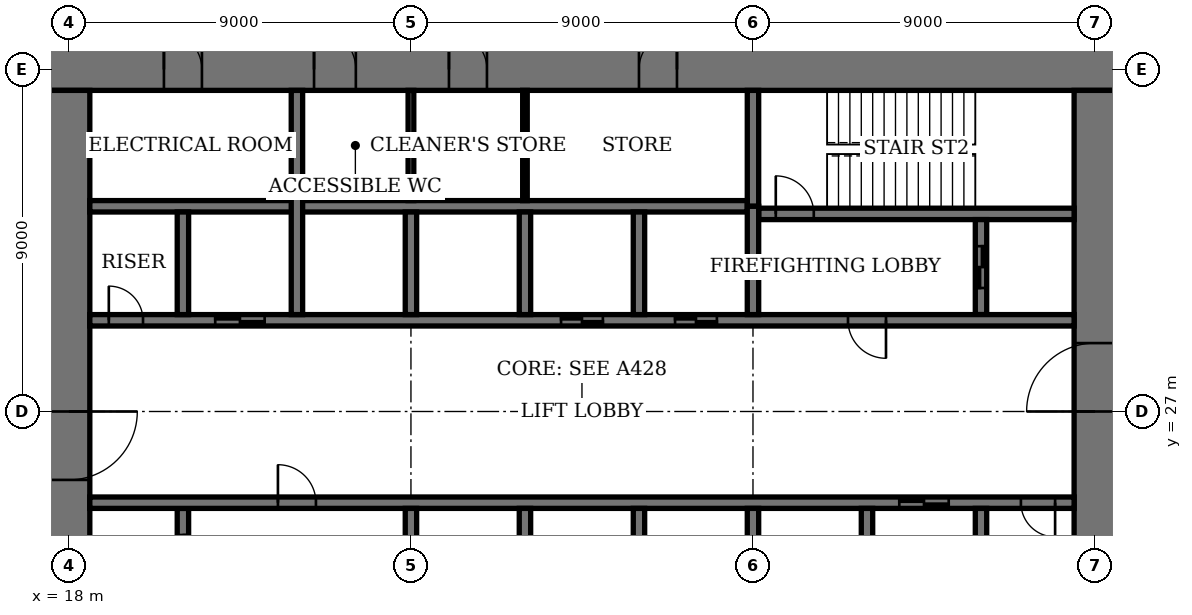
"""IFC4 building model, lengths in metres.
Left out: names, types, materials, properties, quantities, classifications, styles, units other than length and angle.
Written with IfcOpenShell. Run it as: python <this file> out.ifc"""

import sys

from ifc_helpers import new_model, si_unit, direction, frame, frame_2d, origin, place, context, subcontext, project, spatial, rectangle, extrude, element, fill, save


model = new_model("IFC4")
c1 = context("Model", 3, precision=1e-05, world=origin(), true_north=direction((0.0, 1.0)))
c2 = subcontext(c1, "Body", "Model", "MODEL_VIEW")
j1 = project(units=[si_unit("LENGTHUNIT", "METRE"), si_unit("PLANEANGLEUNIT", "RADIAN")], contexts=[c1])
p1 = place(None, origin())
s1 = spatial("IfcSite", under=j1, at=p1, CompositionType="ELEMENT")
p2 = place(p1, origin())
s2 = spatial("IfcBuilding", under=s1, at=p2, CompositionType="ELEMENT")
p3 = place(p2, frame((0.0, 0.0, 121.0)))
s3 = spatial("IfcBuildingStorey", under=s2, at=p3, CompositionType="ELEMENT", Elevation=121.0)
p4 = place(p3, frame((45.55, 36.0, 0.0), z_axis=(0.0, 0.0, 1.0), x_axis=(-1.0, 0.0, 0.0)))
e1 = element("IfcWall", 1, at=p4, inside=s3, PredefinedType="SHEAR", context=c2, shape_type="SweptSolid", body=[
    extrude(rectangle(XDim=28.1, YDim=1.1, at=frame_2d((14.05, 0.0))), origin(), (0.0, 0.0, 1.0), 4.0),
])
p5 = place(p4, frame((11.55, 0.0, 0.0)))
e2 = element("IfcOpeningElement", 2, at=p5, cuts=e1, PredefinedType="OPENING", context=c2, shape_type="SweptSolid", body=[
    extrude(rectangle(XDim=1.0, YDim=2.4, at=frame_2d((0.5, 1.2))), frame((0.0, 0.56, 0.0), z_axis=(0.0, -1.0, 0.0), x_axis=(1.0, 0.0, 0.0)), (0.0, 0.0, 1.0), 1.12),
])
p6 = place(p4, frame((16.55, 0.0, 0.0)))
e3 = element("IfcOpeningElement", 3, at=p6, cuts=e1, PredefinedType="OPENING", context=c2, shape_type="SweptSolid", body=[
    extrude(rectangle(XDim=1.0, YDim=2.4, at=frame_2d((0.5, 1.2))), frame((0.0, 0.56, 0.0), z_axis=(0.0, -1.0, 0.0), x_axis=(1.0, 0.0, 0.0)), (0.0, 0.0, 1.0), 1.12),
])
p7 = place(p4, frame((20.0, 0.0, 0.0)))
e4 = element("IfcOpeningElement", 4, at=p7, cuts=e1, PredefinedType="OPENING", context=c2, shape_type="SweptSolid", body=[
    extrude(rectangle(XDim=1.1, YDim=2.4, at=frame_2d((0.55, 1.2))), frame((0.0, 0.56, 0.0), z_axis=(0.0, -1.0, 0.0), x_axis=(1.0, 0.0, 0.0)), (0.0, 0.0, 1.0), 1.12),
])
p8 = place(p4, frame((24.05, 0.0, 0.0)))
e5 = element("IfcOpeningElement", 5, at=p8, cuts=e1, PredefinedType="OPENING", context=c2, shape_type="SweptSolid", body=[
    extrude(rectangle(XDim=1.0, YDim=2.4, at=frame_2d((0.5, 1.2))), frame((0.0, 0.56, 0.0), z_axis=(0.0, -1.0, 0.0), x_axis=(1.0, 0.0, 0.0)), (0.0, 0.0, 1.0), 1.12),
])
p9 = place(p3, frame((18.0, 35.45, 0.0), z_axis=(0.0, 0.0, 1.0), x_axis=(0.0, -1.0, 0.0)))
e6 = element("IfcWall", 6, at=p9, inside=s3, PredefinedType="SHEAR", context=c2, shape_type="SweptSolid", body=[
    extrude(rectangle(XDim=16.9, YDim=1.1, at=frame_2d((8.45, 0.0))), origin(), (0.0, 0.0, 1.0), 4.0),
])
p10 = place(p9, frame((8.45, 0.0, 0.0)))
e7 = element("IfcOpeningElement", 7, at=p10, cuts=e6, PredefinedType="OPENING", context=c2, shape_type="SweptSolid", body=[
    extrude(rectangle(XDim=1.8, YDim=2.4, at=frame_2d((0.9, 1.2))), frame((0.0, 0.56, 0.0), z_axis=(0.0, -1.0, 0.0), x_axis=(1.0, 0.0, 0.0)), (0.0, 0.0, 1.0), 1.12),
])
p11 = place(p3, frame((45.0, 18.55, 0.0), z_axis=(0.0, 0.0, 1.0), x_axis=(0.0, 1.0, 0.0)))
e8 = element("IfcWall", 8, at=p11, inside=s3, PredefinedType="SHEAR", context=c2, shape_type="SweptSolid", body=[
    extrude(rectangle(XDim=16.9, YDim=1.1, at=frame_2d((8.45, 0.0))), origin(), (0.0, 0.0, 1.0), 4.0),
])
p12 = place(p11, frame((8.45, 0.0, 0.0)))
e9 = element("IfcOpeningElement", 9, at=p12, cuts=e8, PredefinedType="OPENING", context=c2, shape_type="SweptSolid", body=[
    extrude(rectangle(XDim=1.8, YDim=2.4, at=frame_2d((0.9, 1.2))), frame((0.0, 0.56, 0.0), z_axis=(0.0, -1.0, 0.0), x_axis=(1.0, 0.0, 0.0)), (0.0, 0.0, 1.0), 1.12),
])
p13 = place(p3, frame((36.15, 32.2, 0.0), z_axis=(0.0, 0.0, 1.0), x_axis=(1.0, 0.0, 0.0)))
e10 = element("IfcWall", 10, at=p13, inside=s3, PredefinedType="SHEAR", context=c2, shape_type="SweptSolid", body=[
    extrude(rectangle(XDim=8.3, YDim=0.3, at=frame_2d((4.15, 0.0))), origin(), (0.0, 0.0, 1.0), 4.0),
])
p14 = place(p13, frame((0.45, 0.0, 0.0)))
e11 = element("IfcOpeningElement", 11, at=p14, cuts=e10, PredefinedType="OPENING", context=c2, shape_type="SweptSolid", body=[
    extrude(rectangle(XDim=1.0, YDim=2.4, at=frame_2d((0.5, 1.2))), frame((0.0, 0.16, 0.0), z_axis=(0.0, -1.0, 0.0), x_axis=(1.0, 0.0, 0.0)), (0.0, 0.0, 1.0), 0.32),
])
p15 = place(p3, frame((36.0, 32.4, 0.0), z_axis=(0.0, 0.0, 1.0), x_axis=(0.0, 1.0, 0.0)))
e12 = element("IfcWall", 12, at=p15, inside=s3, PredefinedType="SHEAR", context=c2, shape_type="SweptSolid", body=[
    extrude(rectangle(XDim=3.05, YDim=0.3, at=frame_2d((1.525, 0.0))), origin(), (0.0, 0.0, 1.0), 4.0),
])
p16 = place(p3, frame((21.0, 21.95, 0.0), z_axis=(0.0, 0.0, 1.0), x_axis=(0.0, 1.0, 0.0)))
e13 = element("IfcWall", 13, at=p16, inside=s3, PredefinedType="SHEAR", context=c2, shape_type="SweptSolid", body=[
    extrude(rectangle(XDim=2.5, YDim=0.3, at=frame_2d((1.25, 0.0))), origin(), (0.0, 0.0, 1.0), 4.0),
])
p17 = place(p16, frame((0.7, 0.0, 0.0)))
e14 = element("IfcOpeningElement", 14, at=p17, cuts=e13, PredefinedType="OPENING", context=c2, shape_type="SweptSolid", body=[
    extrude(rectangle(XDim=1.1, YDim=2.4, at=frame_2d((0.55, 1.2))), frame((0.0, 0.16, 0.0), z_axis=(0.0, -1.0, 0.0), x_axis=(1.0, 0.0, 0.0)), (0.0, 0.0, 1.0), 0.32),
])
p18 = place(p3, frame((42.0, 29.55, 0.0), z_axis=(0.0, 0.0, 1.0), x_axis=(0.0, 1.0, 0.0)))
e15 = element("IfcWall", 15, at=p18, inside=s3, PredefinedType="SHEAR", context=c2, shape_type="SweptSolid", body=[
    extrude(rectangle(XDim=2.5, YDim=0.3, at=frame_2d((1.25, 0.0))), origin(), (0.0, 0.0, 1.0), 4.0),
])
p19 = place(p18, frame((0.7, 0.0, 0.0)))
e16 = element("IfcOpeningElement", 16, at=p19, cuts=e15, PredefinedType="OPENING", context=c2, shape_type="SweptSolid", body=[
    extrude(rectangle(XDim=1.1, YDim=2.4, at=frame_2d((0.55, 1.2))), frame((0.0, 0.16, 0.0), z_axis=(0.0, -1.0, 0.0), x_axis=(1.0, 0.0, 0.0)), (0.0, 0.0, 1.0), 0.32),
])
p20 = place(p3, frame((18.55, 24.6, 0.0), z_axis=(0.0, 0.0, 1.0), x_axis=(1.0, 0.0, 0.0)))
e17 = element("IfcWall", 17, at=p20, inside=s3, PredefinedType="SHEAR", context=c2, shape_type="SweptSolid", body=[
    extrude(rectangle(XDim=25.9, YDim=0.3, at=frame_2d((12.95, 0.0))), origin(), (0.0, 0.0, 1.0), 4.0),
])
p21 = place(p20, frame((4.95, 0.0, 0.0)))
e18 = element("IfcOpeningElement", 18, at=p21, cuts=e17, PredefinedType="OPENING", context=c2, shape_type="SweptSolid", body=[
    extrude(rectangle(XDim=1.0, YDim=2.4, at=frame_2d((0.5, 1.2))), frame((0.0, 0.16, 0.0), z_axis=(0.0, -1.0, 0.0), x_axis=(1.0, 0.0, 0.0)), (0.0, 0.0, 1.0), 0.32),
])
p22 = place(p20, frame((24.5, 0.0, 0.0)))
e19 = element("IfcOpeningElement", 19, at=p22, cuts=e17, PredefinedType="OPENING", context=c2, shape_type="SweptSolid", body=[
    extrude(rectangle(XDim=0.9, YDim=2.1, at=frame_2d((0.45, 1.05))), frame((0.0, 0.16, 0.0), z_axis=(0.0, -1.0, 0.0), x_axis=(1.0, 0.0, 0.0)), (0.0, 0.0, 1.0), 0.32),
])
p23 = place(p20, frame((21.3, 0.0, 0.0)))
e20 = element("IfcOpeningElement", 20, at=p23, cuts=e17, PredefinedType="OPENING", context=c2, shape_type="SweptSolid", body=[
    extrude(rectangle(XDim=1.3, YDim=2.4, at=frame_2d((0.65, 1.2))), frame((0.0, 0.16, 0.0), z_axis=(0.0, -1.0, 0.0), x_axis=(1.0, 0.0, 0.0)), (0.0, 0.0, 1.0), 0.32),
])
p24 = place(p3, frame((18.55, 29.4, 0.0), z_axis=(0.0, 0.0, 1.0), x_axis=(1.0, 0.0, 0.0)))
e21 = element("IfcWall", 21, at=p24, inside=s3, PredefinedType="SHEAR", context=c2, shape_type="SweptSolid", body=[
    extrude(rectangle(XDim=25.9, YDim=0.3, at=frame_2d((12.95, 0.0))), origin(), (0.0, 0.0, 1.0), 4.0),
])
p25 = place(p24, frame((19.95, 0.0, 0.0)))
e22 = element("IfcOpeningElement", 22, at=p25, cuts=e21, PredefinedType="OPENING", context=c2, shape_type="SweptSolid", body=[
    extrude(rectangle(XDim=1.0, YDim=2.4, at=frame_2d((0.5, 1.2))), frame((0.0, 0.16, 0.0), z_axis=(0.0, -1.0, 0.0), x_axis=(1.0, 0.0, 0.0)), (0.0, 0.0, 1.0), 0.32),
])
p26 = place(p24, frame((0.5, 0.0, 0.0)))
e23 = element("IfcOpeningElement", 23, at=p26, cuts=e21, PredefinedType="OPENING", context=c2, shape_type="SweptSolid", body=[
    extrude(rectangle(XDim=0.9, YDim=2.1, at=frame_2d((0.45, 1.05))), frame((0.0, 0.16, 0.0), z_axis=(0.0, -1.0, 0.0), x_axis=(1.0, 0.0, 0.0)), (0.0, 0.0, 1.0), 0.32),
])
p27 = place(p24, frame((15.4, 0.0, 0.0)))
e24 = element("IfcOpeningElement", 24, at=p27, cuts=e21, PredefinedType="OPENING", context=c2, shape_type="SweptSolid", body=[
    extrude(rectangle(XDim=1.1, YDim=2.4, at=frame_2d((0.55, 1.2))), frame((0.0, 0.16, 0.0), z_axis=(0.0, -1.0, 0.0), x_axis=(1.0, 0.0, 0.0)), (0.0, 0.0, 1.0), 0.32),
])
p28 = place(p24, frame((12.4, 0.0, 0.0)))
e25 = element("IfcOpeningElement", 25, at=p28, cuts=e21, PredefinedType="OPENING", context=c2, shape_type="SweptSolid", body=[
    extrude(rectangle(XDim=1.1, YDim=2.4, at=frame_2d((0.55, 1.2))), frame((0.0, 0.16, 0.0), z_axis=(0.0, -1.0, 0.0), x_axis=(1.0, 0.0, 0.0)), (0.0, 0.0, 1.0), 0.32),
])
p29 = place(p24, frame((3.3, 0.0, 0.0)))
e26 = element("IfcOpeningElement", 26, at=p29, cuts=e21, PredefinedType="OPENING", context=c2, shape_type="SweptSolid", body=[
    extrude(rectangle(XDim=1.3, YDim=2.4, at=frame_2d((0.65, 1.2))), frame((0.0, 0.16, 0.0), z_axis=(0.0, -1.0, 0.0), x_axis=(1.0, 0.0, 0.0)), (0.0, 0.0, 1.0), 0.32),
])
p30 = place(p3, frame((18.55, 32.4, 0.0), z_axis=(0.0, 0.0, 1.0), x_axis=(1.0, 0.0, 0.0)))
e27 = element("IfcWall", 27, at=p30, inside=s3, PredefinedType="SHEAR", context=c2, shape_type="SweptSolid", body=[
    extrude(rectangle(XDim=17.3, YDim=0.3, at=frame_2d((8.65, 0.0))), origin(), (0.0, 0.0, 1.0), 4.0),
])
for number, where, z_axis, x_axis in (
    (28, (30.0, 21.75, 0.0), (0.0, 0.0, 1.0), (0.0, 1.0, 0.0)),
    (29, (33.0, 29.55, 0.0), (0.0, 0.0, 1.0), (0.0, 1.0, 0.0)),
    (30, (33.0, 21.75, 0.0), (0.0, 0.0, 1.0), (0.0, 1.0, 0.0)),
    (31, (30.0, 29.55, 0.0), (0.0, 0.0, 1.0), (0.0, 1.0, 0.0)),
    (32, (36.0, 21.75, 0.0), (0.0, 0.0, 1.0), (0.0, 1.0, 0.0)),
    (33, (27.0, 29.55, 0.0), (0.0, 0.0, 1.0), (0.0, 1.0, 0.0)),
):
    element("IfcWall", number, at=place(p3, frame(where, z_axis=z_axis, x_axis=x_axis)), inside=s3, PredefinedType="SHEAR", context=c2, shape_type="SweptSolid", body=[
        extrude(rectangle(XDim=2.7, YDim=0.3, at=frame_2d((1.35, 0.0))), origin(), (0.0, 0.0, 1.0), 4.0),
    ])
for number, where, z_axis, x_axis in (
    (34, (39.0, 18.55, 0.0), (0.0, 0.0, 1.0), (0.0, 1.0, 0.0)),
    (35, (24.0, 29.55, 0.0), (0.0, 0.0, 1.0), (0.0, 1.0, 0.0)),
):
    element("IfcWall", number, at=place(p3, frame(where, z_axis=z_axis, x_axis=x_axis)), inside=s3, PredefinedType="SHEAR", context=c2, shape_type="SweptSolid", body=[
        extrude(rectangle(XDim=5.9, YDim=0.3, at=frame_2d((2.95, 0.0))), origin(), (0.0, 0.0, 1.0), 4.0),
    ])
for number, where, z_axis, x_axis in (
    (36, (42.0, 21.75, 0.0), (0.0, 0.0, 1.0), (0.0, 1.0, 0.0)),
    (37, (21.0, 29.55, 0.0), (0.0, 0.0, 1.0), (0.0, 1.0, 0.0)),
):
    element("IfcWall", number, at=place(p3, frame(where, z_axis=z_axis, x_axis=x_axis)), inside=s3, PredefinedType="SHEAR", context=c2, shape_type="SweptSolid", body=[
        extrude(rectangle(XDim=2.7, YDim=0.3, at=frame_2d((1.35, 0.0))), origin(), (0.0, 0.0, 1.0), 4.0),
    ])
for number, where, z_axis, x_axis in (
    (38, (27.0, 21.6, 0.0), (0.0, 0.0, 1.0), (0.0, 1.0, 0.0)),
    (39, (36.0, 29.55, 0.0), (0.0, 0.0, 1.0), (0.0, 1.0, 0.0)),
):
    element("IfcWall", number, at=place(p3, frame(where, z_axis=z_axis, x_axis=x_axis)), inside=s3, PredefinedType="SHEAR", context=c2, shape_type="SweptSolid", body=[
        extrude(rectangle(XDim=2.85, YDim=0.3, at=frame_2d((1.425, 0.0))), origin(), (0.0, 0.0, 1.0), 4.0),
    ])
p31 = place(p3, frame((30.0, 32.55, 0.0), z_axis=(0.0, 0.0, 1.0), x_axis=(0.0, 1.0, 0.0)))
e40 = element("IfcWall", 40, at=p31, inside=s3, PredefinedType="PARTITIONING", context=c2, shape_type="SweptSolid", body=[
    extrude(rectangle(XDim=2.9, YDim=0.12, at=frame_2d((1.45, 0.0))), origin(), (0.0, 0.0, 1.0), 3.75),
])
p32 = place(p3, frame((27.0, 32.55, 0.0), z_axis=(0.0, 0.0, 1.0), x_axis=(0.0, 1.0, 0.0)))
e41 = element("IfcWall", 41, at=p32, inside=s3, PredefinedType="PARTITIONING", context=c2, shape_type="SweptSolid", body=[
    extrude(rectangle(XDim=2.9, YDim=0.15, at=frame_2d((1.45, 0.0))), origin(), (0.0, 0.0, 1.0), 3.75),
])
p33 = place(p10, origin())
e42 = element("IfcDoor", 42, at=p33, inside=s3, OperationType="DOUBLE_DOOR_DOUBLE_SWING", PredefinedType="DOOR", context=c2, shape_type="SweptSolid", body=[
    extrude(rectangle(XDim=1.8, YDim=2.4, at=frame_2d((0.9, 1.2))), frame((0.0, 0.03, 0.0), z_axis=(0.0, -1.0, 0.0), x_axis=(1.0, 0.0, 0.0)), (0.0, 0.0, 1.0), 0.06),
    extrude(rectangle(XDim=0.04, YDim=2.4, at=frame_2d((0.02, 1.2))), frame((0.0, 0.55, 0.0), z_axis=(0.0, -1.0, 0.0), x_axis=(1.0, 0.0, 0.0)), (0.0, 0.0, 1.0), 1.1),
    extrude(rectangle(XDim=0.04, YDim=2.4, at=frame_2d((1.78, 1.2))), frame((0.0, 0.55, 0.0), z_axis=(0.0, -1.0, 0.0), x_axis=(1.0, 0.0, 0.0)), (0.0, 0.0, 1.0), 1.1),
    extrude(rectangle(XDim=1.8, YDim=0.04, at=frame_2d((0.9, 2.38))), frame((0.0, 0.55, 0.0), z_axis=(0.0, -1.0, 0.0), x_axis=(1.0, 0.0, 0.0)), (0.0, 0.0, 1.0), 1.1),
])
fill(e7, e42)
p34 = place(p12, origin())
e43 = element("IfcDoor", 43, at=p34, inside=s3, OperationType="DOUBLE_DOOR_DOUBLE_SWING", PredefinedType="DOOR", context=c2, shape_type="SweptSolid", body=[
    extrude(rectangle(XDim=1.8, YDim=2.4, at=frame_2d((0.9, 1.2))), frame((0.0, 0.03, 0.0), z_axis=(0.0, -1.0, 0.0), x_axis=(1.0, 0.0, 0.0)), (0.0, 0.0, 1.0), 0.06),
    extrude(rectangle(XDim=0.04, YDim=2.4, at=frame_2d((0.02, 1.2))), frame((0.0, 0.55, 0.0), z_axis=(0.0, -1.0, 0.0), x_axis=(1.0, 0.0, 0.0)), (0.0, 0.0, 1.0), 1.1),
    extrude(rectangle(XDim=0.04, YDim=2.4, at=frame_2d((1.78, 1.2))), frame((0.0, 0.55, 0.0), z_axis=(0.0, -1.0, 0.0), x_axis=(1.0, 0.0, 0.0)), (0.0, 0.0, 1.0), 1.1),
    extrude(rectangle(XDim=1.8, YDim=0.04, at=frame_2d((0.9, 2.38))), frame((0.0, 0.55, 0.0), z_axis=(0.0, -1.0, 0.0), x_axis=(1.0, 0.0, 0.0)), (0.0, 0.0, 1.0), 1.1),
])
fill(e9, e43)
p35 = place(p5, origin())
e44 = element("IfcDoor", 44, at=p35, inside=s3, OperationType="SINGLE_SWING_LEFT", PredefinedType="DOOR", context=c2, shape_type="SweptSolid", body=[
    extrude(rectangle(XDim=1.0, YDim=2.4, at=frame_2d((0.5, 1.2))), frame((0.0, 0.025, 0.0), z_axis=(0.0, -1.0, 0.0), x_axis=(1.0, 0.0, 0.0)), (0.0, 0.0, 1.0), 0.05),
    extrude(rectangle(XDim=0.04, YDim=2.4, at=frame_2d((0.02, 1.2))), frame((0.0, 0.4, 0.0), z_axis=(0.0, -1.0, 0.0), x_axis=(1.0, 0.0, 0.0)), (0.0, 0.0, 1.0), 0.8),
    extrude(rectangle(XDim=0.04, YDim=2.4, at=frame_2d((0.98, 1.2))), frame((0.0, 0.4, 0.0), z_axis=(0.0, -1.0, 0.0), x_axis=(1.0, 0.0, 0.0)), (0.0, 0.0, 1.0), 0.8),
    extrude(rectangle(XDim=1.0, YDim=0.04, at=frame_2d((0.5, 2.38))), frame((0.0, 0.4, 0.0), z_axis=(0.0, -1.0, 0.0), x_axis=(1.0, 0.0, 0.0)), (0.0, 0.0, 1.0), 0.8),
])
fill(e2, e44)
p36 = place(p6, origin())
e45 = element("IfcDoor", 45, at=p36, inside=s3, OperationType="SINGLE_SWING_RIGHT", PredefinedType="DOOR", context=c2, shape_type="SweptSolid", body=[
    extrude(rectangle(XDim=1.0, YDim=2.4, at=frame_2d((0.5, 1.2))), frame((0.0, 0.025, 0.0), z_axis=(0.0, -1.0, 0.0), x_axis=(1.0, 0.0, 0.0)), (0.0, 0.0, 1.0), 0.05),
    extrude(rectangle(XDim=0.04, YDim=2.4, at=frame_2d((0.02, 1.2))), frame((0.0, 0.4, 0.0), z_axis=(0.0, -1.0, 0.0), x_axis=(1.0, 0.0, 0.0)), (0.0, 0.0, 1.0), 0.8),
    extrude(rectangle(XDim=0.04, YDim=2.4, at=frame_2d((0.98, 1.2))), frame((0.0, 0.4, 0.0), z_axis=(0.0, -1.0, 0.0), x_axis=(1.0, 0.0, 0.0)), (0.0, 0.0, 1.0), 0.8),
    extrude(rectangle(XDim=1.0, YDim=0.04, at=frame_2d((0.5, 2.38))), frame((0.0, 0.4, 0.0), z_axis=(0.0, -1.0, 0.0), x_axis=(1.0, 0.0, 0.0)), (0.0, 0.0, 1.0), 0.8),
])
fill(e3, e45)
p37 = place(p7, origin())
e46 = element("IfcDoor", 46, at=p37, inside=s3, OperationType="SINGLE_SWING_RIGHT", PredefinedType="DOOR", context=c2, shape_type="SweptSolid", body=[
    extrude(rectangle(XDim=1.1, YDim=2.4, at=frame_2d((0.55, 1.2))), frame((0.0, 0.025, 0.0), z_axis=(0.0, -1.0, 0.0), x_axis=(1.0, 0.0, 0.0)), (0.0, 0.0, 1.0), 0.05),
    extrude(rectangle(XDim=0.04, YDim=2.4, at=frame_2d((0.02, 1.2))), frame((0.0, 0.44, 0.0), z_axis=(0.0, -1.0, 0.0), x_axis=(1.0, 0.0, 0.0)), (0.0, 0.0, 1.0), 0.88),
    extrude(rectangle(XDim=0.04, YDim=2.4, at=frame_2d((1.08, 1.2))), frame((0.0, 0.44, 0.0), z_axis=(0.0, -1.0, 0.0), x_axis=(1.0, 0.0, 0.0)), (0.0, 0.0, 1.0), 0.88),
    extrude(rectangle(XDim=1.1, YDim=0.04, at=frame_2d((0.55, 2.38))), frame((0.0, 0.44, 0.0), z_axis=(0.0, -1.0, 0.0), x_axis=(1.0, 0.0, 0.0)), (0.0, 0.0, 1.0), 0.88),
])
fill(e4, e46)
p38 = place(p8, origin())
e47 = element("IfcDoor", 47, at=p38, inside=s3, OperationType="SINGLE_SWING_RIGHT", PredefinedType="DOOR", context=c2, shape_type="SweptSolid", body=[
    extrude(rectangle(XDim=1.0, YDim=2.4, at=frame_2d((0.5, 1.2))), frame((0.0, 0.025, 0.0), z_axis=(0.0, -1.0, 0.0), x_axis=(1.0, 0.0, 0.0)), (0.0, 0.0, 1.0), 0.05),
    extrude(rectangle(XDim=0.04, YDim=2.4, at=frame_2d((0.02, 1.2))), frame((0.0, 0.4, 0.0), z_axis=(0.0, -1.0, 0.0), x_axis=(1.0, 0.0, 0.0)), (0.0, 0.0, 1.0), 0.8),
    extrude(rectangle(XDim=0.04, YDim=2.4, at=frame_2d((0.98, 1.2))), frame((0.0, 0.4, 0.0), z_axis=(0.0, -1.0, 0.0), x_axis=(1.0, 0.0, 0.0)), (0.0, 0.0, 1.0), 0.8),
    extrude(rectangle(XDim=1.0, YDim=0.04, at=frame_2d((0.5, 2.38))), frame((0.0, 0.4, 0.0), z_axis=(0.0, -1.0, 0.0), x_axis=(1.0, 0.0, 0.0)), (0.0, 0.0, 1.0), 0.8),
])
fill(e5, e47)
p39 = place(p14, origin())
e48 = element("IfcDoor", 48, at=p39, inside=s3, OperationType="SINGLE_SWING_RIGHT", PredefinedType="DOOR", context=c2, shape_type="SweptSolid", body=[
    extrude(rectangle(XDim=1.0, YDim=2.4, at=frame_2d((0.5, 1.2))), frame((0.0, 0.03, 0.0), z_axis=(0.0, -1.0, 0.0), x_axis=(1.0, 0.0, 0.0)), (0.0, 0.0, 1.0), 0.06),
])
fill(e11, e48)
p40 = place(p21, origin())
e49 = element("IfcDoor", 49, at=p40, inside=s3, OperationType="SINGLE_SWING_RIGHT", PredefinedType="DOOR", context=c2, shape_type="SweptSolid", body=[
    extrude(rectangle(XDim=1.0, YDim=2.4, at=frame_2d((0.5, 1.2))), frame((0.0, 0.03, 0.0), z_axis=(0.0, -1.0, 0.0), x_axis=(1.0, 0.0, 0.0)), (0.0, 0.0, 1.0), 0.06),
])
fill(e18, e49)
p41 = place(p25, origin())
e50 = element("IfcDoor", 50, at=p41, inside=s3, OperationType="SINGLE_SWING_RIGHT", PredefinedType="DOOR", context=c2, shape_type="SweptSolid", body=[
    extrude(rectangle(XDim=1.0, YDim=2.4, at=frame_2d((0.5, 1.2))), frame((0.0, 0.03, 0.0), z_axis=(0.0, -1.0, 0.0), x_axis=(1.0, 0.0, 0.0)), (0.0, 0.0, 1.0), 0.06),
])
fill(e22, e50)
p42 = place(p22, origin())
e51 = element("IfcDoor", 51, at=p42, inside=s3, OperationType="SINGLE_SWING_RIGHT", PredefinedType="DOOR", context=c2, shape_type="SweptSolid", body=[
    extrude(rectangle(XDim=0.9, YDim=2.1, at=frame_2d((0.45, 1.05))), frame((0.0, 0.03, 0.0), z_axis=(0.0, -1.0, 0.0), x_axis=(1.0, 0.0, 0.0)), (0.0, 0.0, 1.0), 0.06),
])
fill(e19, e51)
p43 = place(p26, origin())
e52 = element("IfcDoor", 52, at=p43, inside=s3, OperationType="SINGLE_SWING_RIGHT", PredefinedType="DOOR", context=c2, shape_type="SweptSolid", body=[
    extrude(rectangle(XDim=0.9, YDim=2.1, at=frame_2d((0.45, 1.05))), frame((0.0, 0.03, 0.0), z_axis=(0.0, -1.0, 0.0), x_axis=(1.0, 0.0, 0.0)), (0.0, 0.0, 1.0), 0.06),
])
fill(e23, e52)
p44 = place(p27, origin())
e53 = element("IfcDoor", 53, at=p44, inside=s3, OperationType="DOUBLE_DOOR_SLIDING", PredefinedType="DOOR", context=c2, shape_type="SweptSolid", body=[
    extrude(rectangle(XDim=1.1, YDim=2.4, at=frame_2d((0.55, 1.2))), frame((0.0, 0.02, 0.0), z_axis=(0.0, -1.0, 0.0), x_axis=(1.0, 0.0, 0.0)), (0.0, 0.0, 1.0), 0.04),
])
fill(e24, e53)
p45 = place(p28, origin())
e54 = element("IfcDoor", 54, at=p45, inside=s3, OperationType="DOUBLE_DOOR_SLIDING", PredefinedType="DOOR", context=c2, shape_type="SweptSolid", body=[
    extrude(rectangle(XDim=1.1, YDim=2.4, at=frame_2d((0.55, 1.2))), frame((0.0, 0.02, 0.0), z_axis=(0.0, -1.0, 0.0), x_axis=(1.0, 0.0, 0.0)), (0.0, 0.0, 1.0), 0.04),
])
fill(e25, e54)
p46 = place(p23, origin())
e55 = element("IfcDoor", 55, at=p46, inside=s3, OperationType="DOUBLE_DOOR_SLIDING", PredefinedType="DOOR", context=c2, shape_type="SweptSolid", body=[
    extrude(rectangle(XDim=1.3, YDim=2.4, at=frame_2d((0.65, 1.2))), frame((0.0, 0.02, 0.0), z_axis=(0.0, -1.0, 0.0), x_axis=(1.0, 0.0, 0.0)), (0.0, 0.0, 1.0), 0.04),
])
fill(e20, e55)
p47 = place(p29, origin())
e56 = element("IfcDoor", 56, at=p47, inside=s3, OperationType="DOUBLE_DOOR_SLIDING", PredefinedType="DOOR", context=c2, shape_type="SweptSolid", body=[
    extrude(rectangle(XDim=1.3, YDim=2.4, at=frame_2d((0.65, 1.2))), frame((0.0, 0.02, 0.0), z_axis=(0.0, -1.0, 0.0), x_axis=(1.0, 0.0, 0.0)), (0.0, 0.0, 1.0), 0.04),
])
fill(e26, e56)
p48 = place(p19, origin())
e57 = element("IfcDoor", 57, at=p48, inside=s3, OperationType="DOUBLE_DOOR_SLIDING", PredefinedType="DOOR", context=c2, shape_type="SweptSolid", body=[
    extrude(rectangle(XDim=1.1, YDim=2.4, at=frame_2d((0.55, 1.2))), frame((0.0, 0.03, 0.0), z_axis=(0.0, -1.0, 0.0), x_axis=(1.0, 0.0, 0.0)), (0.0, 0.0, 1.0), 0.06),
])
fill(e16, e57)
save(model, sys.argv[1])
